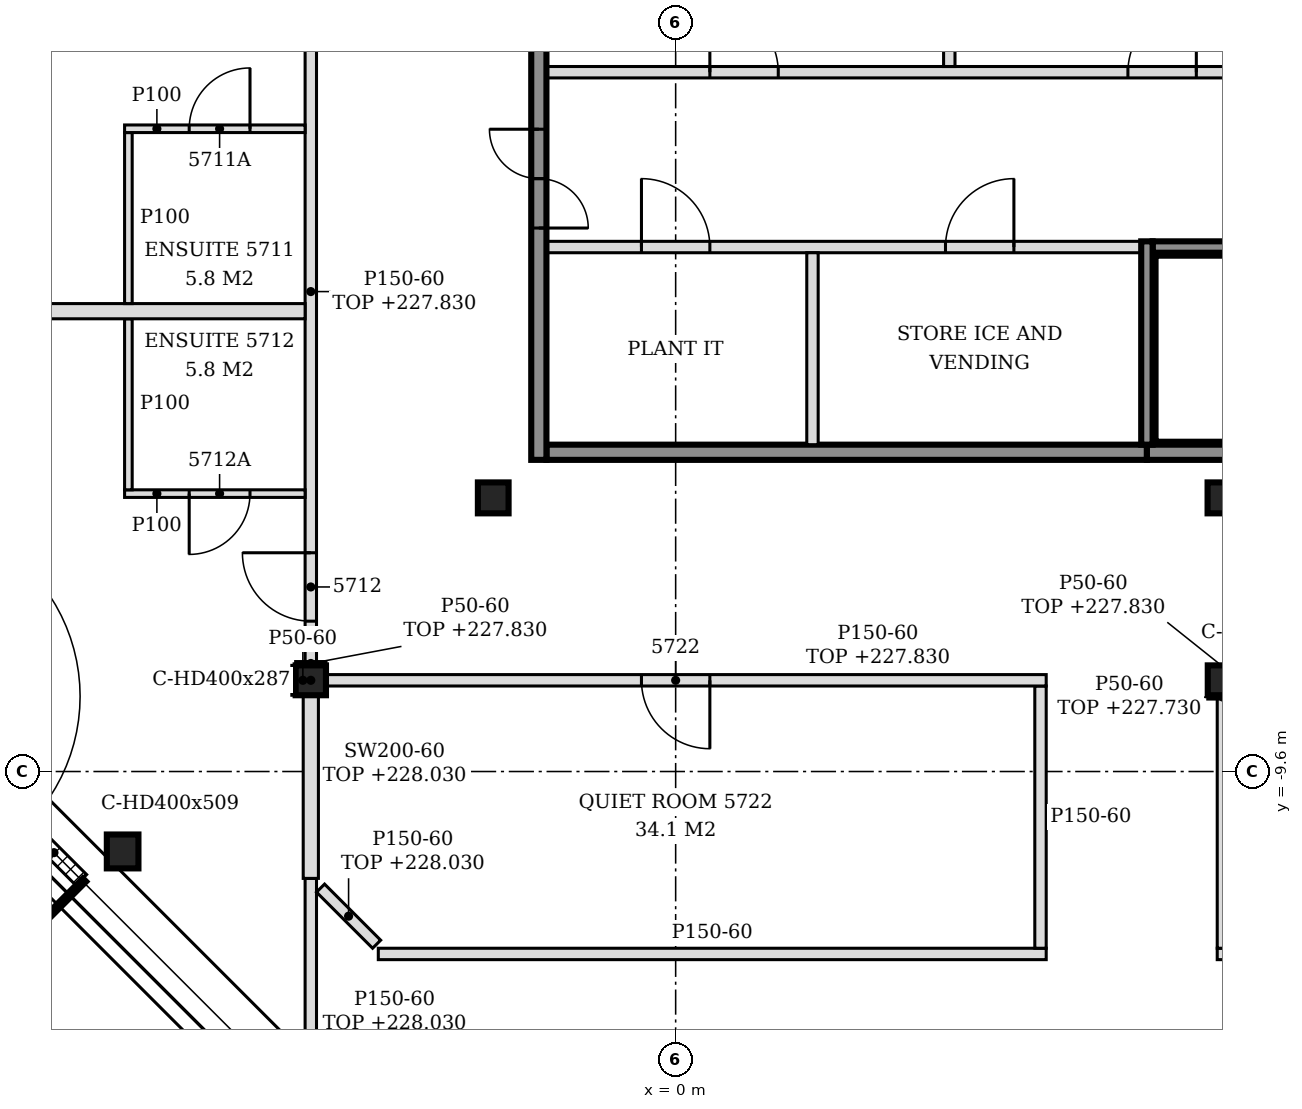
"""IFC4 building model, lengths in metres.
Left out: names, types, materials, properties, quantities, classifications, styles, units other than length and angle.
Written with IfcOpenShell. Run it as: python <this file> out.ifc"""

import sys

from ifc_helpers import new_model, si_unit, direction, frame, frame_2d, origin, origin_2d, place, context, subcontext, project, spatial, polyline, rectangle, i_section, outline, extrude, element, fill, save


model = new_model("IFC4")
c1 = context("Model", 3, precision=1e-05, world=origin(), true_north=direction((0.0, 1.0)))
c2 = subcontext(c1, "Body", "Model", "MODEL_VIEW")
j1 = project(units=[si_unit("LENGTHUNIT", "METRE"), si_unit("PLANEANGLEUNIT", "RADIAN")], contexts=[c1])
p1 = place(None, origin())
s1 = spatial("IfcSite", under=j1, at=p1, CompositionType="ELEMENT")
p2 = place(p1, origin())
s2 = spatial("IfcBuilding", under=s1, at=p2, CompositionType="ELEMENT")
p3 = place(p2, frame((0.0, 0.0, 225.0)))
s3 = spatial("IfcBuildingStorey", under=s2, at=p3, CompositionType="ELEMENT", Elevation=225.0)
p4 = place(p3, frame((-7.276, -10.652, -0.15), z_axis=(0.0, 0.0, 1.0), x_axis=(1.0, 0.0, 0.0)))
e1 = element("IfcColumn", 1, at=p4, inside=s3, PredefinedType="COLUMN", context=c2, shape_type="SweptSolid", body=[
    extrude(i_section(OverallWidth=0.416, OverallDepth=0.446, WebThickness=0.039, FlangeThickness=0.063, FilletRadius=0.015, at=origin_2d()), origin(), (0.0, 0.0, 1.0), 3.6),
])
for number, where, z_axis, x_axis in (
    (2, (-4.8, -8.4, -0.15), (0.0, 0.0, 1.0), (1.0, 0.0, 0.0)),
    (3, (7.2, -8.4, -0.15), (0.0, 0.0, 1.0), (1.0, 0.0, 0.0)),
):
    element("IfcColumn", number, at=place(p3, frame(where, z_axis=z_axis, x_axis=x_axis)), inside=s3, PredefinedType="COLUMN", context=c2, shape_type="SweptSolid", body=[
        extrude(i_section(OverallWidth=0.399, OverallDepth=0.393, WebThickness=0.023, FlangeThickness=0.037, FilletRadius=0.015, at=origin_2d()), origin(), (0.0, 0.0, 1.0), 3.6),
    ])
for number, where, z_axis, x_axis in (
    (4, (-2.4, -6.0, -0.15), (0.0, 0.0, 1.0), (1.0, 0.0, 0.0)),
    (5, (7.2, -6.0, -0.15), (0.0, 0.0, 1.0), (1.0, 0.0, 0.0)),
):
    element("IfcColumn", number, at=place(p3, frame(where, z_axis=z_axis, x_axis=x_axis)), inside=s3, PredefinedType="COLUMN", context=c2, shape_type="SweptSolid", body=[
        extrude(i_section(OverallWidth=0.404, OverallDepth=0.407, WebThickness=0.027, FlangeThickness=0.044, FilletRadius=0.015, at=origin_2d()), origin(), (0.0, 0.0, 1.0), 3.6),
    ])
p5 = place(p3, frame((-10.953, -7.893, 0.0), z_axis=(0.0, 0.0, 1.0), x_axis=(0.707106781187, -0.707106781187, 0.0)))
e6 = element("IfcWall", 6, at=p5, inside=s3, PredefinedType="NOTDEFINED", context=c2, shape_type="SweptSolid", body=[
    extrude(rectangle(XDim=4.431, YDim=0.2, at=frame_2d((2.215, 0.0))), origin(), (0.0, 0.0, 1.0), 3.45),
])
p6 = place(p5, frame((1.015, 0.0, 0.0)))
e7 = element("IfcOpeningElement", 7, at=p6, cuts=e6, PredefinedType="OPENING", context=c2, shape_type="SweptSolid", body=[
    extrude(rectangle(XDim=2.4, YDim=2.4, at=frame_2d((1.2, 1.2))), frame((0.0, 0.11, 0.0), z_axis=(0.0, -1.0, 0.0), x_axis=(1.0, 0.0, 0.0)), (0.0, 0.0, 1.0), 0.22),
])
p7 = place(p3, frame((-1.7, -5.4, 0.0), z_axis=(0.0, 0.0, 1.0), x_axis=(1.0, 0.0, 0.0)))
e8 = element("IfcWall", 8, at=p7, inside=s3, PredefinedType="SOLIDWALL", context=c2, shape_type="SweptSolid", body=[
    extrude(rectangle(XDim=7.9, YDim=0.2, at=frame_2d((3.95, 0.0))), origin(), (0.0, 0.0, 1.0), 3.45),
])
p8 = place(p3, frame((6.2, -5.4, 0.0), z_axis=(0.0, 0.0, 1.0), x_axis=(1.0, 0.0, 0.0)))
e9 = element("IfcWall", 9, at=p8, inside=s3, PredefinedType="SOLIDWALL", context=c2, shape_type="SweptSolid", body=[
    extrude(rectangle(XDim=6.5, YDim=0.2, at=frame_2d((3.25, 0.0))), origin(), (0.0, 0.0, 1.0), 3.45),
])
p9 = place(p3, frame((-1.7, -2.7, 0.0), z_axis=(0.0, 0.0, 1.0), x_axis=(1.0, 0.0, 0.0)))
e10 = element("IfcWall", 10, at=p9, inside=s3, PredefinedType="PARTITIONING", context=c2, shape_type="SweptSolid", body=[
    extrude(rectangle(XDim=7.825, YDim=0.15, at=frame_2d((3.913, 0.0))), origin(), (0.0, 0.0, 1.0), 3.45),
])
p10 = place(p9, frame((1.25, 0.0, 0.0)))
e11 = element("IfcOpeningElement", 11, at=p10, cuts=e10, PredefinedType="OPENING", context=c2, shape_type="SweptSolid", body=[
    extrude(rectangle(XDim=0.9, YDim=2.1, at=frame_2d((0.45, 1.05))), frame((0.0, 0.085, 0.0), z_axis=(0.0, -1.0, 0.0), x_axis=(1.0, 0.0, 0.0)), (0.0, 0.0, 1.0), 0.17),
])
p11 = place(p9, frame((5.25, 0.0, 0.0)))
e12 = element("IfcOpeningElement", 12, at=p11, cuts=e10, PredefinedType="OPENING", context=c2, shape_type="SweptSolid", body=[
    extrude(rectangle(XDim=0.9, YDim=2.1, at=frame_2d((0.45, 1.05))), frame((0.0, 0.085, 0.0), z_axis=(0.0, -1.0, 0.0), x_axis=(1.0, 0.0, 0.0)), (0.0, 0.0, 1.0), 0.17),
])
p12 = place(p3, frame((6.275, -2.7, 0.0), z_axis=(0.0, 0.0, 1.0), x_axis=(1.0, 0.0, 0.0)))
e13 = element("IfcWall", 13, at=p12, inside=s3, PredefinedType="SOLIDWALL", context=c2, shape_type="SweptSolid", body=[
    extrude(rectangle(XDim=6.35, YDim=0.15, at=frame_2d((3.175, 0.0))), origin(), (0.0, 0.0, 1.0), 3.45),
])
p13 = place(p12, frame((5.225, 0.0, 0.0)))
e14 = element("IfcOpeningElement", 14, at=p13, cuts=e13, PredefinedType="OPENING", context=c2, shape_type="SweptSolid", body=[
    extrude(rectangle(XDim=1.0, YDim=2.1, at=frame_2d((0.5, 1.05))), frame((0.0, 0.085, 0.0), z_axis=(0.0, -1.0, 0.0), x_axis=(1.0, 0.0, 0.0)), (0.0, 0.0, 1.0), 0.17),
])
p14 = place(p3, frame((-1.7, -0.4, 0.0), z_axis=(0.0, 0.0, 1.0), x_axis=(1.0, 0.0, 0.0)))
e15 = element("IfcWall", 15, at=p14, inside=s3, PredefinedType="PARTITIONING", context=c2, shape_type="SweptSolid", body=[
    extrude(rectangle(XDim=10.825, YDim=0.15, at=frame_2d((5.413, 0.0))), origin(), (0.0, 0.0, 1.0), 3.45),
])
p15 = place(p14, frame((2.15, 0.0, 0.0)))
e16 = element("IfcOpeningElement", 16, at=p15, cuts=e15, PredefinedType="OPENING", context=c2, shape_type="SweptSolid", body=[
    extrude(rectangle(XDim=0.9, YDim=2.1, at=frame_2d((0.45, 1.05))), frame((0.0, 0.085, 0.0), z_axis=(0.0, -1.0, 0.0), x_axis=(1.0, 0.0, 0.0)), (0.0, 0.0, 1.0), 0.17),
])
p16 = place(p14, frame((7.65, 0.0, 0.0)))
e17 = element("IfcOpeningElement", 17, at=p16, cuts=e15, PredefinedType="OPENING", context=c2, shape_type="SweptSolid", body=[
    extrude(rectangle(XDim=0.9, YDim=2.1, at=frame_2d((0.45, 1.05))), frame((0.0, 0.085, 0.0), z_axis=(0.0, -1.0, 0.0), x_axis=(1.0, 0.0, 0.0)), (0.0, 0.0, 1.0), 0.17),
])
p17 = place(p3, frame((-1.8, -5.5, 0.0), z_axis=(0.0, 0.0, 1.0), x_axis=(0.0, 1.0, 0.0)))
e18 = element("IfcWall", 18, at=p17, inside=s3, PredefinedType="SOLIDWALL", context=c2, shape_type="SweptSolid", body=[
    extrude(rectangle(XDim=15.8, YDim=0.2, at=frame_2d((7.9, 0.0))), origin(), (0.0, 0.0, 1.0), 3.45),
])
p18 = place(p17, frame((3.05, 0.0, 0.0)))
e19 = element("IfcOpeningElement", 19, at=p18, cuts=e18, PredefinedType="OPENING", context=c2, shape_type="SweptSolid", body=[
    extrude(rectangle(XDim=1.3, YDim=2.1, at=frame_2d((0.65, 1.05))), frame((0.0, 0.11, 0.0), z_axis=(0.0, -1.0, 0.0), x_axis=(1.0, 0.0, 0.0)), (0.0, 0.0, 1.0), 0.22),
])
p19 = place(p17, frame((11.45, 0.0, 0.0)))
e20 = element("IfcOpeningElement", 20, at=p19, cuts=e18, PredefinedType="OPENING", context=c2, shape_type="SweptSolid", body=[
    extrude(rectangle(XDim=1.3, YDim=2.1, at=frame_2d((0.65, 1.05))), frame((0.0, 0.11, 0.0), z_axis=(0.0, -1.0, 0.0), x_axis=(1.0, 0.0, 0.0)), (0.0, 0.0, 1.0), 0.22),
])
p20 = place(p3, frame((1.8, -5.3, 0.0), z_axis=(0.0, 0.0, 1.0), x_axis=(0.0, 1.0, 0.0)))
e21 = element("IfcWall", 21, at=p20, inside=s3, PredefinedType="PARTITIONING", context=c2, shape_type="SweptSolid", body=[
    extrude(rectangle(XDim=2.525, YDim=0.15, at=frame_2d((1.263, 0.0))), origin(), (0.0, 0.0, 1.0), 3.45),
])
p21 = place(p3, frame((3.6, -0.325, 0.0), z_axis=(0.0, 0.0, 1.0), x_axis=(0.0, 1.0, 0.0)))
e22 = element("IfcWall", 22, at=p21, inside=s3, PredefinedType="PARTITIONING", context=c2, shape_type="SweptSolid", body=[
    extrude(rectangle(XDim=2.45, YDim=0.15, at=frame_2d((1.225, 0.0))), origin(), (0.0, 0.0, 1.0), 3.45),
])
p22 = place(p3, frame((6.2, -5.3, 0.0), z_axis=(0.0, 0.0, 1.0), x_axis=(0.0, 1.0, 0.0)))
e23 = element("IfcWall", 23, at=p22, inside=s3, PredefinedType="SOLIDWALL", context=c2, shape_type="SweptSolid", body=[
    extrude(rectangle(XDim=2.675, YDim=0.15, at=frame_2d((1.337, 0.0))), origin(), (0.0, 0.0, 1.0), 3.45),
])
p23 = place(p3, frame((-4.8, -13.926, 0.0), z_axis=(0.0, 0.0, 1.0), x_axis=(0.0, 1.0, 0.0)))
e24 = element("IfcWall", 24, at=p23, inside=s3, PredefinedType="PARTITIONING", context=c2, shape_type="SweptSolid", body=[
    extrude(outline(polyline([(0.0, 0.0), (2.92, 0.0), (2.92, 3.03), (1.369, 3.03), (1.367, 2.63), (0.229, 2.63), (0.227, 3.03), (0.0, 3.03), (0.0, 0.0)])), frame((0.0, 0.075, 0.0), z_axis=(0.0, -1.0, 0.0), x_axis=(1.0, 0.0, 0.0)), (0.0, 0.0, 1.0), 0.15),
])
p24 = place(p3, frame((-3.912, -12.0, 0.0), z_axis=(0.0, 0.0, 1.0), x_axis=(1.0, 0.0, 0.0)))
e25 = element("IfcWall", 25, at=p24, inside=s3, PredefinedType="PARTITIONING", context=c2, shape_type="SweptSolid", body=[
    extrude(rectangle(XDim=8.787, YDim=0.15, at=frame_2d((4.394, 0.0))), origin(), (0.0, 0.0, 1.0), 3.45),
])
p25 = place(p3, frame((7.125, -12.0, 0.0), z_axis=(0.0, 0.0, 1.0), x_axis=(1.0, 0.0, 0.0)))
e26 = element("IfcWall", 26, at=p25, inside=s3, PredefinedType="PARTITIONING", context=c2, shape_type="SweptSolid", body=[
    extrude(outline(polyline([(0.0, 0.0), (8.581, 0.0), (8.581, 3.45), (0.225, 3.45), (0.223, 2.73), (0.0, 2.73), (0.0, 0.0)])), frame((0.0, 0.075, 0.0), z_axis=(0.0, -1.0, 0.0), x_axis=(1.0, 0.0, 0.0)), (0.0, 0.0, 1.0), 0.15),
])
p26 = place(p25, frame((1.325, 0.0, 0.0)))
e27 = element("IfcOpeningElement", 27, at=p26, cuts=e26, PredefinedType="OPENING", context=c2, shape_type="SweptSolid", body=[
    extrude(rectangle(XDim=0.8, YDim=2.1, at=frame_2d((0.4, 1.05))), frame((0.0, 0.085, 0.0), z_axis=(0.0, -1.0, 0.0), x_axis=(1.0, 0.0, 0.0)), (0.0, 0.0, 1.0), 0.17),
])
p27 = place(p3, frame((-3.934, -11.872, 0.0), z_axis=(0.0, 0.0, 1.0), x_axis=(-0.707106781187, 0.707106781187, 0.0)))
e28 = element("IfcWall", 28, at=p27, inside=s3, PredefinedType="PARTITIONING", context=c2, shape_type="SweptSolid", body=[
    extrude(rectangle(XDim=1.044, YDim=0.15, at=frame_2d((0.522, 0.0))), origin(), (0.0, 0.0, 1.0), 3.03),
])
p28 = place(p3, frame((4.8, -11.925, 0.0), z_axis=(0.0, 0.0, 1.0), x_axis=(0.0, 1.0, 0.0)))
e29 = element("IfcWall", 29, at=p28, inside=s3, PredefinedType="PARTITIONING", context=c2, shape_type="SweptSolid", body=[
    extrude(outline(polyline([(0.0, 0.0), (3.45, 0.0), (3.45, 2.83), (3.375, 2.83), (3.373, 3.45), (0.0, 3.45), (0.0, 0.0)])), frame((0.0, 0.075, 0.0), z_axis=(0.0, -1.0, 0.0), x_axis=(1.0, 0.0, 0.0)), (0.0, 0.0, 1.0), 0.15),
])
p29 = place(p3, frame((7.2, -11.925, 0.0), z_axis=(0.0, 0.0, 1.0), x_axis=(0.0, 1.0, 0.0)))
e30 = element("IfcWall", 30, at=p29, inside=s3, PredefinedType="PARTITIONING", context=c2, shape_type="SweptSolid", body=[
    extrude(rectangle(XDim=3.329, YDim=0.15, at=frame_2d((1.664, 0.0))), origin(), (0.0, 0.0, 1.0), 2.73),
])
p30 = place(p3, frame((-4.8, -11.006, 0.0), z_axis=(0.0, 0.0, 1.0), x_axis=(0.0, 1.0, 0.0)))
e31 = element("IfcWall", 31, at=p30, inside=s3, PredefinedType="PARTITIONING", context=c2, shape_type="SweptSolid", body=[
    extrude(rectangle(XDim=2.41, YDim=0.2, at=frame_2d((1.205, 0.0))), origin(), (0.0, 0.0, 1.0), 3.03),
])
p31 = place(p3, frame((-4.601, -8.4, 0.0), z_axis=(0.0, 0.0, 1.0), x_axis=(1.0, 0.0, 0.0)))
e32 = element("IfcWall", 32, at=p31, inside=s3, PredefinedType="PARTITIONING", context=c2, shape_type="SweptSolid", body=[
    extrude(rectangle(XDim=9.476, YDim=0.15, at=frame_2d((4.738, 0.0))), origin(), (0.0, 0.0, 1.0), 2.83),
])
p32 = place(p31, frame((4.15, 0.0, 0.0)))
e33 = element("IfcOpeningElement", 33, at=p32, cuts=e32, PredefinedType="OPENING", context=c2, shape_type="SweptSolid", body=[
    extrude(rectangle(XDim=0.9, YDim=2.1, at=frame_2d((0.45, 1.05))), frame((0.0, 0.085, 0.0), z_axis=(0.0, -1.0, 0.0), x_axis=(1.0, 0.0, 0.0)), (0.0, 0.0, 1.0), 0.17),
])
p33 = place(p3, frame((-4.8, -8.204, 0.0), z_axis=(0.0, 0.0, 1.0), x_axis=(0.0, 1.0, 0.0)))
e34 = element("IfcWall", 34, at=p33, inside=s3, PredefinedType="PARTITIONING", context=c2, shape_type="SweptSolid", body=[
    extrude(rectangle(XDim=10.407, YDim=0.15, at=frame_2d((5.204, 0.0))), origin(), (0.0, 0.0, 1.0), 2.83),
])
p34 = place(p33, frame((8.354, 0.0, 0.0)))
e35 = element("IfcOpeningElement", 35, at=p34, cuts=e34, PredefinedType="OPENING", context=c2, shape_type="SweptSolid", body=[
    extrude(rectangle(XDim=0.9, YDim=2.1, at=frame_2d((0.45, 1.05))), frame((0.0, 0.085, 0.0), z_axis=(0.0, -1.0, 0.0), x_axis=(1.0, 0.0, 0.0)), (0.0, 0.0, 1.0), 0.17),
])
p35 = place(p33, frame((0.582, 0.0, 0.0)))
e36 = element("IfcOpeningElement", 36, at=p35, cuts=e34, PredefinedType="OPENING", context=c2, shape_type="SweptSolid", body=[
    extrude(rectangle(XDim=0.9, YDim=2.1, at=frame_2d((0.45, 1.05))), frame((0.0, 0.085, 0.0), z_axis=(0.0, -1.0, 0.0), x_axis=(1.0, 0.0, 0.0)), (0.0, 0.0, 1.0), 0.17),
])
p36 = place(p3, frame((-7.25, -5.944, 0.0), z_axis=(0.0, 0.0, 1.0), x_axis=(1.0, 0.0, 0.0)))
e37 = element("IfcWall", 37, at=p36, inside=s3, PredefinedType="PARTITIONING", context=c2, shape_type="SweptSolid", body=[
    extrude(outline(polyline([(0.0, 0.0), (2.375, 0.0), (2.375, 2.83), (2.3, 2.83), (2.298, 3.45), (0.0, 3.45), (0.0, 0.0)])), frame((0.0, 0.05, 0.0), z_axis=(0.0, -1.0, 0.0), x_axis=(1.0, 0.0, 0.0)), (0.0, 0.0, 1.0), 0.1),
])
p37 = place(p36, frame((0.85, 0.0, 0.0)))
e38 = element("IfcOpeningElement", 38, at=p37, cuts=e37, PredefinedType="OPENING", context=c2, shape_type="SweptSolid", body=[
    extrude(rectangle(XDim=0.8, YDim=2.1, at=frame_2d((0.4, 1.05))), frame((0.0, 0.06, 0.0), z_axis=(0.0, -1.0, 0.0), x_axis=(1.0, 0.0, 0.0)), (0.0, 0.0, 1.0), 0.12),
])
p38 = place(p3, frame((-7.2, -5.894, 0.0), z_axis=(0.0, 0.0, 1.0), x_axis=(0.0, 1.0, 0.0)))
e39 = element("IfcWall", 39, at=p38, inside=s3, PredefinedType="PARTITIONING", context=c2, shape_type="SweptSolid", body=[
    extrude(outline(polyline([(0.0, 0.0), (2.25, 0.0), (2.25, 3.45), (1.189, 3.45), (1.187, 2.98), (0.999, 2.98), (0.997, 3.45), (0.0, 3.45), (0.0, 0.0)])), frame((0.0, 0.05, 0.0), z_axis=(0.0, -1.0, 0.0), x_axis=(1.0, 0.0, 0.0)), (0.0, 0.0, 1.0), 0.1),
])
p39 = place(p3, frame((-14.103, -3.544, 0.0), z_axis=(0.0, 0.0, 1.0), x_axis=(1.0, 0.0, 0.0)))
e40 = element("IfcWall", 40, at=p39, inside=s3, PredefinedType="PARTITIONING", context=c2, shape_type="SweptSolid", body=[
    extrude(outline(polyline([(0.0, 0.0), (9.228, 0.0), (9.228, 2.83), (9.153, 2.83), (9.151, 3.45), (0.753, 3.45), (0.751, 2.93), (0.453, 2.93), (0.451, 3.45), (0.0, 3.45), (0.0, 0.0)])), frame((0.0, 0.1, 0.0), z_axis=(0.0, -1.0, 0.0), x_axis=(1.0, 0.0, 0.0)), (0.0, 0.0, 1.0), 0.2),
])
p40 = place(p3, frame((-7.2, -3.444, 0.0), z_axis=(0.0, 0.0, 1.0), x_axis=(0.0, 1.0, 0.0)))
e41 = element("IfcWall", 41, at=p40, inside=s3, PredefinedType="PARTITIONING", context=c2, shape_type="SweptSolid", body=[
    extrude(rectangle(XDim=2.25, YDim=0.1, at=frame_2d((1.125, 0.0))), origin(), (0.0, 0.0, 1.0), 3.45),
])
p41 = place(p3, frame((-7.25, -1.144, 0.0), z_axis=(0.0, 0.0, 1.0), x_axis=(1.0, 0.0, 0.0)))
e42 = element("IfcWall", 42, at=p41, inside=s3, PredefinedType="PARTITIONING", context=c2, shape_type="SweptSolid", body=[
    extrude(outline(polyline([(0.0, 0.0), (2.375, 0.0), (2.375, 2.83), (2.3, 2.83), (2.298, 3.45), (0.0, 3.45), (0.0, 0.0)])), frame((0.0, 0.05, 0.0), z_axis=(0.0, -1.0, 0.0), x_axis=(1.0, 0.0, 0.0)), (0.0, 0.0, 1.0), 0.1),
])
p42 = place(p41, frame((0.85, 0.0, 0.0)))
e43 = element("IfcOpeningElement", 43, at=p42, cuts=e42, PredefinedType="OPENING", context=c2, shape_type="SweptSolid", body=[
    extrude(rectangle(XDim=0.8, YDim=2.1, at=frame_2d((0.4, 1.05))), frame((0.0, 0.06, 0.0), z_axis=(0.0, -1.0, 0.0), x_axis=(1.0, 0.0, 0.0)), (0.0, 0.0, 1.0), 0.12),
])
p43 = place(p3, frame((-5.024, -8.596, 0.0), z_axis=(0.0, 0.0, 1.0), x_axis=(0.0, 1.0, 0.0)))
e44 = element("IfcWall", 44, at=p43, inside=s3, PredefinedType="PARTITIONING", context=c2, shape_type="SweptSolid", body=[
    extrude(rectangle(XDim=0.393, YDim=0.05, at=frame_2d((0.196, 0.0))), origin(), (0.0, 0.0, 1.0), 3.45),
])
p44 = place(p3, frame((-5.0, -8.178, 0.0), z_axis=(0.0, 0.0, 1.0), x_axis=(1.0, 0.0, 0.0)))
e45 = element("IfcWall", 45, at=p44, inside=s3, PredefinedType="PARTITIONING", context=c2, shape_type="SweptSolid", body=[
    extrude(rectangle(XDim=0.399, YDim=0.05, at=frame_2d((0.199, 0.0))), origin(), (0.0, 0.0, 1.0), 2.83),
])
p45 = place(p3, frame((7.0, -8.622, 0.0), z_axis=(0.0, 0.0, 1.0), x_axis=(1.0, 0.0, 0.0)))
e46 = element("IfcWall", 46, at=p45, inside=s3, PredefinedType="PARTITIONING", context=c2, shape_type="SweptSolid", body=[
    extrude(rectangle(XDim=0.399, YDim=0.05, at=frame_2d((0.199, 0.0))), origin(), (0.0, 0.0, 1.0), 2.73),
])
p46 = place(p18, origin())
e47 = element("IfcDoor", 47, at=p46, inside=s3, OperationType="DOUBLE_DOOR_SINGLE_SWING", PredefinedType="DOOR", context=c2, shape_type="SweptSolid", body=[
    extrude(rectangle(XDim=1.3, YDim=2.1, at=frame_2d((0.65, 1.05))), frame((0.0, 0.025, 0.0), z_axis=(0.0, -1.0, 0.0), x_axis=(1.0, 0.0, 0.0)), (0.0, 0.0, 1.0), 0.05),
])
fill(e19, e47)
p47 = place(p10, origin())
e48 = element("IfcDoor", 48, at=p47, inside=s3, OperationType="SINGLE_SWING_LEFT", PredefinedType="DOOR", context=c2, shape_type="SweptSolid", body=[
    extrude(rectangle(XDim=0.9, YDim=2.1, at=frame_2d((0.45, 1.05))), frame((0.0, 0.025, 0.0), z_axis=(0.0, -1.0, 0.0), x_axis=(1.0, 0.0, 0.0)), (0.0, 0.0, 1.0), 0.05),
])
fill(e11, e48)
p48 = place(p11, origin())
e49 = element("IfcDoor", 49, at=p48, inside=s3, OperationType="SINGLE_SWING_RIGHT", PredefinedType="DOOR", context=c2, shape_type="SweptSolid", body=[
    extrude(rectangle(XDim=0.9, YDim=2.1, at=frame_2d((0.45, 1.05))), frame((0.0, 0.025, 0.0), z_axis=(0.0, -1.0, 0.0), x_axis=(1.0, 0.0, 0.0)), (0.0, 0.0, 1.0), 0.05),
])
fill(e12, e49)
p49 = place(p15, origin())
e50 = element("IfcDoor", 50, at=p49, inside=s3, OperationType="SINGLE_SWING_LEFT", PredefinedType="DOOR", context=c2, shape_type="SweptSolid", body=[
    extrude(rectangle(XDim=0.9, YDim=2.1, at=frame_2d((0.45, 1.05))), frame((0.0, 0.025, 0.0), z_axis=(0.0, -1.0, 0.0), x_axis=(1.0, 0.0, 0.0)), (0.0, 0.0, 1.0), 0.05),
])
fill(e16, e50)
p50 = place(p16, origin())
e51 = element("IfcDoor", 51, at=p50, inside=s3, OperationType="SINGLE_SWING_RIGHT", PredefinedType="DOOR", context=c2, shape_type="SweptSolid", body=[
    extrude(rectangle(XDim=0.9, YDim=2.1, at=frame_2d((0.45, 1.05))), frame((0.0, 0.025, 0.0), z_axis=(0.0, -1.0, 0.0), x_axis=(1.0, 0.0, 0.0)), (0.0, 0.0, 1.0), 0.05),
])
fill(e17, e51)
p51 = place(p42, origin())
e52 = element("IfcDoor", 52, at=p51, inside=s3, OperationType="SINGLE_SWING_RIGHT", PredefinedType="DOOR", context=c2, shape_type="SweptSolid", body=[
    extrude(rectangle(XDim=0.8, YDim=2.1, at=frame_2d((0.4, 1.05))), frame((0.0, 0.025, 0.0), z_axis=(0.0, -1.0, 0.0), x_axis=(1.0, 0.0, 0.0)), (0.0, 0.0, 1.0), 0.05),
])
fill(e43, e52)
p52 = place(p35, origin())
e53 = element("IfcDoor", 53, at=p52, inside=s3, OperationType="SINGLE_SWING_RIGHT", PredefinedType="DOOR", context=c2, shape_type="SweptSolid", body=[
    extrude(rectangle(XDim=0.9, YDim=2.1, at=frame_2d((0.45, 1.05))), frame((0.0, 0.025, 0.0), z_axis=(0.0, -1.0, 0.0), x_axis=(1.0, 0.0, 0.0)), (0.0, 0.0, 1.0), 0.05),
])
fill(e36, e53)
p53 = place(p37, frame((0.8, 0.0, 0.0), z_axis=(0.0, 0.0, 1.0), x_axis=(-1.0, 0.0, 0.0)))
e54 = element("IfcDoor", 54, at=p53, inside=s3, OperationType="SINGLE_SWING_RIGHT", PredefinedType="DOOR", context=c2, shape_type="SweptSolid", body=[
    extrude(rectangle(XDim=0.8, YDim=2.1, at=frame_2d((0.4, 1.05))), frame((0.0, 0.025, 0.0), z_axis=(0.0, -1.0, 0.0), x_axis=(1.0, 0.0, 0.0)), (0.0, 0.0, 1.0), 0.05),
])
fill(e38, e54)
p54 = place(p32, frame((0.9, 0.0, 0.0), z_axis=(0.0, 0.0, 1.0), x_axis=(-1.0, 0.0, 0.0)))
e55 = element("IfcDoor", 55, at=p54, inside=s3, OperationType="SINGLE_SWING_LEFT", PredefinedType="DOOR", context=c2, shape_type="SweptSolid", body=[
    extrude(rectangle(XDim=0.9, YDim=2.1, at=frame_2d((0.45, 1.05))), frame((0.0, 0.025, 0.0), z_axis=(0.0, -1.0, 0.0), x_axis=(1.0, 0.0, 0.0)), (0.0, 0.0, 1.0), 0.05),
])
fill(e33, e55)
save(model, sys.argv[1])
